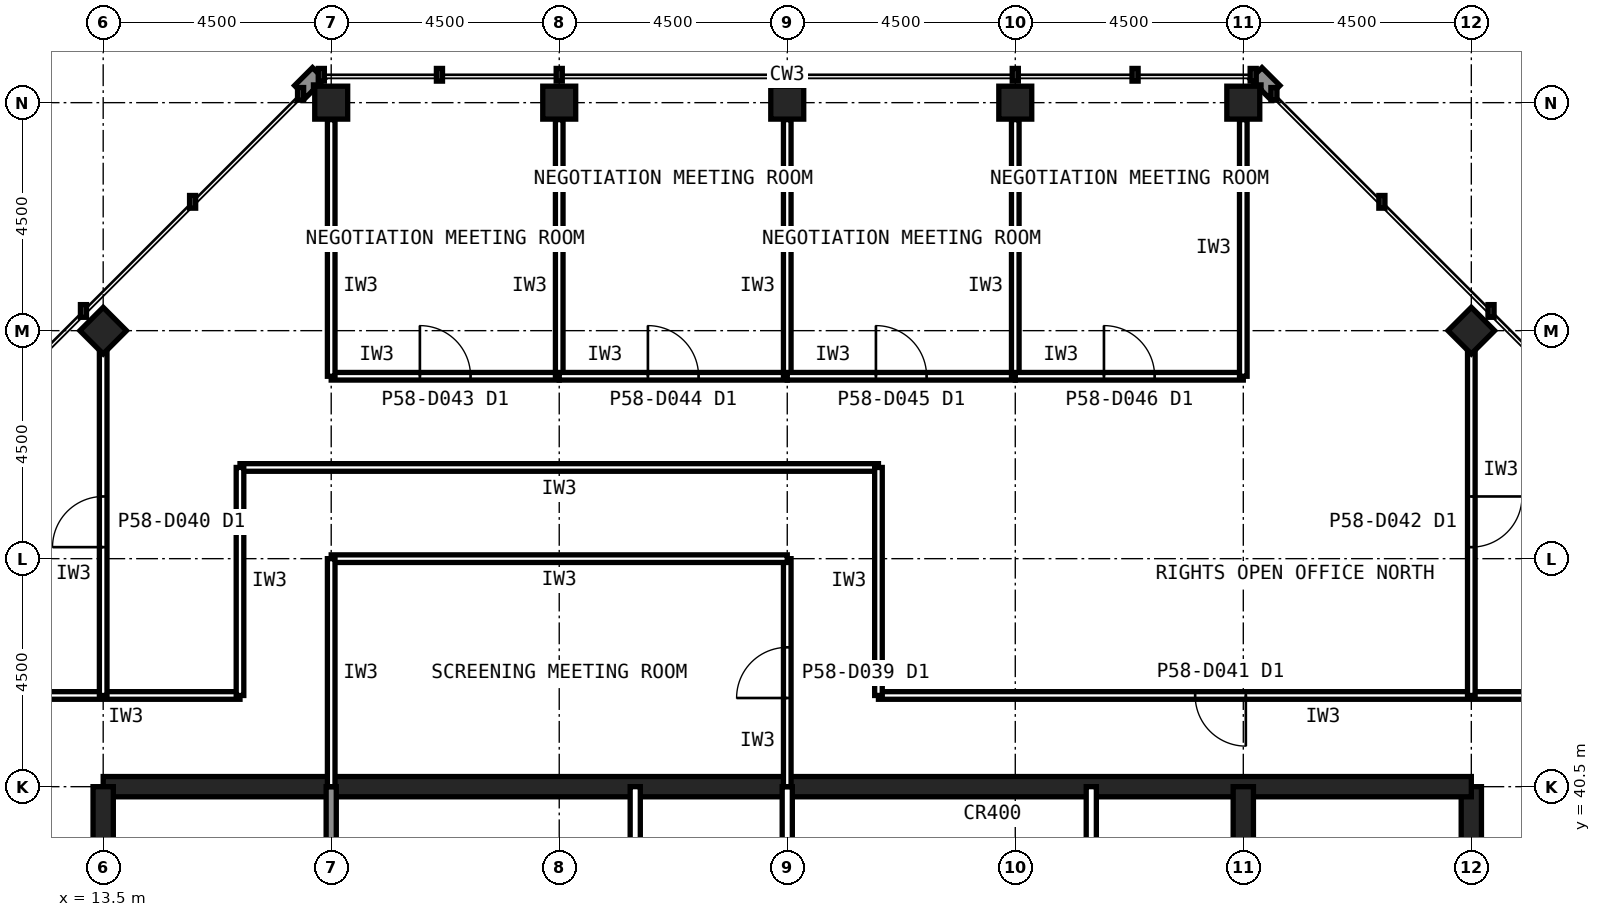
"""IFC4 building model, lengths in metres.
Left out: names, types, materials, properties, quantities, classifications, styles, units other than length and angle.
Written with IfcOpenShell. Run it as: python <this file> out.ifc"""

import sys

from ifc_helpers import new_model, si_unit, direction, frame, frame_2d, origin, origin_2d, place, context, subcontext, project, spatial, rectangle, hollow_rectangle, extrude, element, fill, save


model = new_model("IFC4")
c1 = context("Model", 3, precision=1e-05, world=origin(), true_north=direction((0.0, 1.0)))
c2 = subcontext(c1, "Body", "Model", "MODEL_VIEW")
j1 = project(units=[si_unit("LENGTHUNIT", "METRE"), si_unit("PLANEANGLEUNIT", "RADIAN")], contexts=[c1])
p1 = place(None, origin())
s1 = spatial("IfcSite", under=j1, at=p1, CompositionType="ELEMENT")
p2 = place(p1, origin())
s2 = spatial("IfcBuilding", under=s1, at=p2, CompositionType="ELEMENT")
p3 = place(p2, frame((0.0, 0.0, 246.6)))
s3 = spatial("IfcBuildingStorey", under=s2, at=p3, CompositionType="ELEMENT", Elevation=246.6)
for number, where, z_axis, x_axis in (
    (1, (36.0, 54.0, 0.0), (0.0, 0.0, 1.0), (1.0, 0.0, 0.0)),
    (2, (31.5, 54.0, 0.0), (0.0, 0.0, 1.0), (1.0, 0.0, 0.0)),
    (3, (27.0, 54.0, 0.0), (0.0, 0.0, 1.0), (1.0, 0.0, 0.0)),
    (4, (22.5, 54.0, 0.0), (0.0, 0.0, 1.0), (1.0, 0.0, 0.0)),
    (5, (18.0, 54.0, 0.0), (0.0, 0.0, 1.0), (1.0, 0.0, 0.0)),
    (6, (40.5, 49.5, 0.0), (0.0, 0.0, 1.0), (0.707, 0.707, 0.0)),
    (7, (13.5, 49.5, 0.0), (0.0, 0.0, 1.0), (0.707, 0.707, 0.0)),
):
    element("IfcColumn", number, at=place(p3, frame(where, z_axis=z_axis, x_axis=x_axis)), inside=s3, PredefinedType="COLUMN", context=c2, shape_type="SweptSolid", body=[
        extrude(hollow_rectangle(XDim=0.65, YDim=0.65, WallThickness=0.032, at=origin_2d()), origin(), (0.0, 0.0, 1.0), 4.0),
    ])
p4 = place(p3, frame((40.5, 13.5, 0.0), z_axis=(0.0, 0.0, 1.0), x_axis=(0.0, 1.0, 0.0)))
e8 = element("IfcWall", 8, at=p4, inside=s3, PredefinedType="SHEAR", context=c2, shape_type="SweptSolid", body=[
    extrude(rectangle(XDim=27.0, YDim=0.4, at=frame_2d((13.5, 0.0))), origin(), (0.0, 0.0, 1.0), 4.0),
])
p5 = place(p4, frame((5.85, 0.0, 0.0)))
e9 = element("IfcOpeningElement", 9, at=p5, cuts=e8, PredefinedType="OPENING", context=c2, shape_type="SweptSolid", body=[
    extrude(rectangle(XDim=1.8, YDim=2.1, at=frame_2d((0.9, 1.05))), frame((0.0, 0.21, 0.0), z_axis=(0.0, -1.0, 0.0), x_axis=(1.0, 0.0, 0.0)), (0.0, 0.0, 1.0), 0.42),
])
p6 = place(p4, frame((19.65, 0.0, 0.0)))
e10 = element("IfcOpeningElement", 10, at=p6, cuts=e8, PredefinedType="OPENING", context=c2, shape_type="SweptSolid", body=[
    extrude(rectangle(XDim=1.2, YDim=2.1, at=frame_2d((0.6, 1.05))), frame((0.0, 0.21, 0.0), z_axis=(0.0, -1.0, 0.0), x_axis=(1.0, 0.0, 0.0)), (0.0, 0.0, 1.0), 0.42),
])
p7 = place(p3, frame((40.5, 40.5, 0.0), z_axis=(0.0, 0.0, 1.0), x_axis=(-1.0, 0.0, 0.0)))
e11 = element("IfcWall", 11, at=p7, inside=s3, PredefinedType="SHEAR", context=c2, shape_type="SweptSolid", body=[
    extrude(rectangle(XDim=27.0, YDim=0.4, at=frame_2d((13.5, 0.0))), origin(), (0.0, 0.0, 1.0), 4.0),
])
p8 = place(p3, frame((13.5, 40.5, 0.0), z_axis=(0.0, 0.0, 1.0), x_axis=(0.0, -1.0, 0.0)))
e12 = element("IfcWall", 12, at=p8, inside=s3, PredefinedType="SHEAR", context=c2, shape_type="SweptSolid", body=[
    extrude(rectangle(XDim=27.0, YDim=0.4, at=frame_2d((13.5, 0.0))), origin(), (0.0, 0.0, 1.0), 4.0),
])
p9 = place(p8, frame((19.65, 0.0, 0.0)))
e13 = element("IfcOpeningElement", 13, at=p9, cuts=e12, PredefinedType="OPENING", context=c2, shape_type="SweptSolid", body=[
    extrude(rectangle(XDim=1.2, YDim=2.1, at=frame_2d((0.6, 1.05))), frame((0.0, 0.21, 0.0), z_axis=(0.0, -1.0, 0.0), x_axis=(1.0, 0.0, 0.0)), (0.0, 0.0, 1.0), 0.42),
])
p10 = place(p8, frame((5.85, 0.0, 0.0)))
e14 = element("IfcOpeningElement", 14, at=p10, cuts=e12, PredefinedType="OPENING", context=c2, shape_type="SweptSolid", body=[
    extrude(rectangle(XDim=1.8, YDim=2.1, at=frame_2d((0.9, 1.05))), frame((0.0, 0.21, 0.0), z_axis=(0.0, -1.0, 0.0), x_axis=(1.0, 0.0, 0.0)), (0.0, 0.0, 1.0), 0.42),
])
p11 = place(p3, frame((18.0, 36.0, 0.0), z_axis=(0.0, 0.0, 1.0), x_axis=(0.0, 1.0, 0.0)))
e15 = element("IfcWall", 15, at=p11, inside=s3, PredefinedType="SOLIDWALL", context=c2, shape_type="SweptSolid", body=[
    extrude(rectangle(XDim=4.5, YDim=0.2, at=frame_2d((2.25, 0.0))), origin(), (0.0, 0.0, 1.0), 3.84),
])
p12 = place(p3, frame((36.0, 22.5, 0.0), z_axis=(0.0, 0.0, 1.0), x_axis=(0.0, 1.0, 0.0)))
e16 = element("IfcWall", 16, at=p12, inside=s3, PredefinedType="SHEAR", context=c2, shape_type="SweptSolid", body=[
    extrude(rectangle(XDim=18.0, YDim=0.4, at=frame_2d((9.0, 0.0))), origin(), (0.0, 0.0, 1.0), 4.0),
])
for number, where, z_axis, x_axis in (
    (17, (24.0, 36.0, 0.0), (0.0, 0.0, 1.0), (0.0, 1.0, 0.0)),
    (18, (27.0, 36.0, 0.0), (0.0, 0.0, 1.0), (0.0, 1.0, 0.0)),
    (19, (33.0, 36.0, 0.0), (0.0, 0.0, 1.0), (0.0, 1.0, 0.0)),
):
    element("IfcWall", number, at=place(p3, frame(where, z_axis=z_axis, x_axis=x_axis)), inside=s3, PredefinedType="PARTITIONING", context=c2, shape_type="SweptSolid", body=[
        extrude(rectangle(XDim=4.5, YDim=0.2, at=frame_2d((2.25, 0.0))), origin(), (0.0, 0.0, 1.0), 3.84),
    ])
p13 = place(p3, frame((42.3, 42.3, 0.0), z_axis=(0.0, 0.0, 1.0), x_axis=(-1.0, 0.0, 0.0)))
e20 = element("IfcWall", 20, at=p13, inside=s3, PredefinedType="PARTITIONING", context=c2, shape_type="SweptSolid", body=[
    extrude(rectangle(XDim=13.5, YDim=0.15, at=frame_2d((6.75, 0.0))), origin(), (0.0, 0.0, 1.0), 3.84),
])
p14 = place(p13, frame((6.25, 0.0, 0.0)))
e21 = element("IfcOpeningElement", 21, at=p14, cuts=e20, PredefinedType="OPENING", context=c2, shape_type="SweptSolid", body=[
    extrude(rectangle(XDim=1.0, YDim=2.1, at=frame_2d((0.5, 1.05))), frame((0.0, 0.085, 0.0), z_axis=(0.0, -1.0, 0.0), x_axis=(1.0, 0.0, 0.0)), (0.0, 0.0, 1.0), 0.17),
])
p15 = place(p3, frame((28.8, 46.8, 0.0), z_axis=(0.0, 0.0, 1.0), x_axis=(-1.0, 0.0, 0.0)))
e22 = element("IfcWall", 22, at=p15, inside=s3, PredefinedType="PARTITIONING", context=c2, shape_type="SweptSolid", body=[
    extrude(rectangle(XDim=12.6, YDim=0.15, at=frame_2d((6.3, 0.0))), origin(), (0.0, 0.0, 1.0), 3.84),
])
for number, where, z_axis, x_axis in (
    (23, (16.2, 42.3, 0.0), (0.0, 0.0, 1.0), (-1.0, 0.0, 0.0)),
    (24, (16.2, 46.8, 0.0), (0.0, 0.0, 1.0), (0.0, -1.0, 0.0)),
    (25, (28.8, 42.3, 0.0), (0.0, 0.0, 1.0), (0.0, 1.0, 0.0)),
):
    element("IfcWall", number, at=place(p3, frame(where, z_axis=z_axis, x_axis=x_axis)), inside=s3, PredefinedType="PARTITIONING", context=c2, shape_type="SweptSolid", body=[
        extrude(rectangle(XDim=4.5, YDim=0.15, at=frame_2d((2.25, 0.0))), origin(), (0.0, 0.0, 1.0), 3.84),
    ])
p16 = place(p3, frame((27.0, 40.5, 0.0), z_axis=(0.0, 0.0, 1.0), x_axis=(0.0, 1.0, 0.0)))
e26 = element("IfcWall", 26, at=p16, inside=s3, PredefinedType="PARTITIONING", context=c2, shape_type="SweptSolid", body=[
    extrude(rectangle(XDim=4.5, YDim=0.15, at=frame_2d((2.25, 0.0))), origin(), (0.0, 0.0, 1.0), 2.989),
])
p17 = place(p16, frame((1.75, 0.0, 0.0)))
e27 = element("IfcOpeningElement", 27, at=p17, cuts=e26, PredefinedType="OPENING", context=c2, shape_type="SweptSolid", body=[
    extrude(rectangle(XDim=1.0, YDim=2.1, at=frame_2d((0.5, 1.05))), frame((0.0, 0.085, 0.0), z_axis=(0.0, -1.0, 0.0), x_axis=(1.0, 0.0, 0.0)), (0.0, 0.0, 1.0), 0.17),
])
p18 = place(p3, frame((27.0, 45.0, 0.0), z_axis=(0.0, 0.0, 1.0), x_axis=(-1.0, 0.0, 0.0)))
e28 = element("IfcWall", 28, at=p18, inside=s3, PredefinedType="PARTITIONING", context=c2, shape_type="SweptSolid", body=[
    extrude(rectangle(XDim=9.0, YDim=0.15, at=frame_2d((4.5, 0.0))), origin(), (0.0, 0.0, 1.0), 3.84),
])
p19 = place(p3, frame((18.0, 45.0, 0.0), z_axis=(0.0, 0.0, 1.0), x_axis=(0.0, -1.0, 0.0)))
e29 = element("IfcWall", 29, at=p19, inside=s3, PredefinedType="PARTITIONING", context=c2, shape_type="SweptSolid", body=[
    extrude(rectangle(XDim=4.5, YDim=0.15, at=frame_2d((2.25, 0.0))), origin(), (0.0, 0.0, 1.0), 2.989),
])
p20 = place(p3, frame((18.0, 48.6, 0.0), z_axis=(0.0, 0.0, 1.0), x_axis=(1.0, 0.0, 0.0)))
e30 = element("IfcWall", 30, at=p20, inside=s3, PredefinedType="PARTITIONING", context=c2, shape_type="SweptSolid", body=[
    extrude(rectangle(XDim=4.5, YDim=0.15, at=frame_2d((2.25, 0.0))), origin(), (0.0, 0.0, 1.0), 3.84),
])
p21 = place(p20, frame((1.75, 0.0, 0.0)))
e31 = element("IfcOpeningElement", 31, at=p21, cuts=e30, PredefinedType="OPENING", context=c2, shape_type="SweptSolid", body=[
    extrude(rectangle(XDim=1.0, YDim=2.1, at=frame_2d((0.5, 1.05))), frame((0.0, 0.085, 0.0), z_axis=(0.0, -1.0, 0.0), x_axis=(1.0, 0.0, 0.0)), (0.0, 0.0, 1.0), 0.17),
])
for number, where, z_axis, x_axis in (
    (32, (22.5, 48.6, 0.0), (0.0, 0.0, 1.0), (0.0, 1.0, 0.0)),
    (33, (18.0, 53.665, 0.0), (0.0, 0.0, 1.0), (0.0, -1.0, 0.0)),
):
    element("IfcWall", number, at=place(p3, frame(where, z_axis=z_axis, x_axis=x_axis)), inside=s3, PredefinedType="PARTITIONING", context=c2, shape_type="SweptSolid", body=[
        extrude(rectangle(XDim=5.065, YDim=0.15, at=frame_2d((2.532, 0.0))), origin(), (0.0, 0.0, 1.0), 2.989),
    ])
p22 = place(p3, frame((22.5, 48.6, 0.0), z_axis=(0.0, 0.0, 1.0), x_axis=(1.0, 0.0, 0.0)))
e34 = element("IfcWall", 34, at=p22, inside=s3, PredefinedType="PARTITIONING", context=c2, shape_type="SweptSolid", body=[
    extrude(rectangle(XDim=4.5, YDim=0.15, at=frame_2d((2.25, 0.0))), origin(), (0.0, 0.0, 1.0), 3.84),
])
p23 = place(p22, frame((1.75, 0.0, 0.0)))
e35 = element("IfcOpeningElement", 35, at=p23, cuts=e34, PredefinedType="OPENING", context=c2, shape_type="SweptSolid", body=[
    extrude(rectangle(XDim=1.0, YDim=2.1, at=frame_2d((0.5, 1.05))), frame((0.0, 0.085, 0.0), z_axis=(0.0, -1.0, 0.0), x_axis=(1.0, 0.0, 0.0)), (0.0, 0.0, 1.0), 0.17),
])
p24 = place(p3, frame((27.0, 48.6, 0.0), z_axis=(0.0, 0.0, 1.0), x_axis=(0.0, 1.0, 0.0)))
e36 = element("IfcWall", 36, at=p24, inside=s3, PredefinedType="PARTITIONING", context=c2, shape_type="SweptSolid", body=[
    extrude(rectangle(XDim=5.065, YDim=0.15, at=frame_2d((2.532, 0.0))), origin(), (0.0, 0.0, 1.0), 2.989),
])
p25 = place(p3, frame((27.0, 48.6, 0.0), z_axis=(0.0, 0.0, 1.0), x_axis=(1.0, 0.0, 0.0)))
e37 = element("IfcWall", 37, at=p25, inside=s3, PredefinedType="PARTITIONING", context=c2, shape_type="SweptSolid", body=[
    extrude(rectangle(XDim=4.5, YDim=0.15, at=frame_2d((2.25, 0.0))), origin(), (0.0, 0.0, 1.0), 3.84),
])
p26 = place(p25, frame((1.75, 0.0, 0.0)))
e38 = element("IfcOpeningElement", 38, at=p26, cuts=e37, PredefinedType="OPENING", context=c2, shape_type="SweptSolid", body=[
    extrude(rectangle(XDim=1.0, YDim=2.1, at=frame_2d((0.5, 1.05))), frame((0.0, 0.085, 0.0), z_axis=(0.0, -1.0, 0.0), x_axis=(1.0, 0.0, 0.0)), (0.0, 0.0, 1.0), 0.17),
])
p27 = place(p3, frame((31.5, 48.6, 0.0), z_axis=(0.0, 0.0, 1.0), x_axis=(0.0, 1.0, 0.0)))
e39 = element("IfcWall", 39, at=p27, inside=s3, PredefinedType="PARTITIONING", context=c2, shape_type="SweptSolid", body=[
    extrude(rectangle(XDim=5.065, YDim=0.15, at=frame_2d((2.532, 0.0))), origin(), (0.0, 0.0, 1.0), 2.989),
])
p28 = place(p3, frame((31.5, 48.6, 0.0), z_axis=(0.0, 0.0, 1.0), x_axis=(1.0, 0.0, 0.0)))
e40 = element("IfcWall", 40, at=p28, inside=s3, PredefinedType="PARTITIONING", context=c2, shape_type="SweptSolid", body=[
    extrude(rectangle(XDim=4.5, YDim=0.15, at=frame_2d((2.25, 0.0))), origin(), (0.0, 0.0, 1.0), 3.84),
])
p29 = place(p28, frame((1.75, 0.0, 0.0)))
e41 = element("IfcOpeningElement", 41, at=p29, cuts=e40, PredefinedType="OPENING", context=c2, shape_type="SweptSolid", body=[
    extrude(rectangle(XDim=1.0, YDim=2.1, at=frame_2d((0.5, 1.05))), frame((0.0, 0.085, 0.0), z_axis=(0.0, -1.0, 0.0), x_axis=(1.0, 0.0, 0.0)), (0.0, 0.0, 1.0), 0.17),
])
p30 = place(p3, frame((36.0, 48.6, 0.0), z_axis=(0.0, 0.0, 1.0), x_axis=(0.0, 1.0, 0.0)))
e42 = element("IfcWall", 42, at=p30, inside=s3, PredefinedType="PARTITIONING", context=c2, shape_type="SweptSolid", body=[
    extrude(rectangle(XDim=5.065, YDim=0.15, at=frame_2d((2.532, 0.0))), origin(), (0.0, 0.0, 1.0), 2.989),
])
p31 = place(p3, frame((40.5, 49.155, 0.0), z_axis=(0.0, 0.0, 1.0), x_axis=(0.0, -1.0, 0.0)))
e43 = element("IfcWall", 43, at=p31, inside=s3, PredefinedType="PARTITIONING", context=c2, shape_type="SweptSolid", body=[
    extrude(rectangle(XDim=6.855, YDim=0.15, at=frame_2d((3.427, 0.0))), origin(), (0.0, 0.0, 1.0), 2.989),
])
p32 = place(p31, frame((2.927, 0.0, 0.0)))
e44 = element("IfcOpeningElement", 44, at=p32, cuts=e43, PredefinedType="OPENING", context=c2, shape_type="SweptSolid", body=[
    extrude(rectangle(XDim=1.0, YDim=2.1, at=frame_2d((0.5, 1.05))), frame((0.0, 0.085, 0.0), z_axis=(0.0, -1.0, 0.0), x_axis=(1.0, 0.0, 0.0)), (0.0, 0.0, 1.0), 0.17),
])
p33 = place(p3, frame((13.5, 42.3, 0.0), z_axis=(0.0, 0.0, 1.0), x_axis=(0.0, 1.0, 0.0)))
e45 = element("IfcWall", 45, at=p33, inside=s3, PredefinedType="PARTITIONING", context=c2, shape_type="SweptSolid", body=[
    extrude(rectangle(XDim=6.855, YDim=0.15, at=frame_2d((3.427, 0.0))), origin(), (0.0, 0.0, 1.0), 2.989),
])
p34 = place(p33, frame((2.927, 0.0, 0.0)))
e46 = element("IfcOpeningElement", 46, at=p34, cuts=e45, PredefinedType="OPENING", context=c2, shape_type="SweptSolid", body=[
    extrude(rectangle(XDim=1.0, YDim=2.1, at=frame_2d((0.5, 1.05))), frame((0.0, 0.085, 0.0), z_axis=(0.0, -1.0, 0.0), x_axis=(1.0, 0.0, 0.0)), (0.0, 0.0, 1.0), 0.17),
])
p35 = place(p14, origin())
e47 = element("IfcDoor", 47, at=p35, inside=s3, OperationType="SINGLE_SWING_LEFT", PredefinedType="DOOR", context=c2, shape_type="SweptSolid", body=[
    extrude(rectangle(XDim=1.0, YDim=2.1, at=frame_2d((0.5, 1.05))), frame((0.0, 0.025, 0.0), z_axis=(0.0, -1.0, 0.0), x_axis=(1.0, 0.0, 0.0)), (0.0, 0.0, 1.0), 0.05),
])
fill(e21, e47)
p36 = place(p17, origin())
e48 = element("IfcDoor", 48, at=p36, inside=s3, OperationType="SINGLE_SWING_LEFT", PredefinedType="DOOR", context=c2, shape_type="SweptSolid", body=[
    extrude(rectangle(XDim=1.0, YDim=2.1, at=frame_2d((0.5, 1.05))), frame((0.0, 0.025, 0.0), z_axis=(0.0, -1.0, 0.0), x_axis=(1.0, 0.0, 0.0)), (0.0, 0.0, 1.0), 0.05),
])
fill(e27, e48)
p37 = place(p21, origin())
e49 = element("IfcDoor", 49, at=p37, inside=s3, OperationType="SINGLE_SWING_LEFT", PredefinedType="DOOR", context=c2, shape_type="SweptSolid", body=[
    extrude(rectangle(XDim=1.0, YDim=2.1, at=frame_2d((0.5, 1.05))), frame((0.0, 0.025, 0.0), z_axis=(0.0, -1.0, 0.0), x_axis=(1.0, 0.0, 0.0)), (0.0, 0.0, 1.0), 0.05),
])
fill(e31, e49)
p38 = place(p23, origin())
e50 = element("IfcDoor", 50, at=p38, inside=s3, OperationType="SINGLE_SWING_LEFT", PredefinedType="DOOR", context=c2, shape_type="SweptSolid", body=[
    extrude(rectangle(XDim=1.0, YDim=2.1, at=frame_2d((0.5, 1.05))), frame((0.0, 0.025, 0.0), z_axis=(0.0, -1.0, 0.0), x_axis=(1.0, 0.0, 0.0)), (0.0, 0.0, 1.0), 0.05),
])
fill(e35, e50)
p39 = place(p26, origin())
e51 = element("IfcDoor", 51, at=p39, inside=s3, OperationType="SINGLE_SWING_LEFT", PredefinedType="DOOR", context=c2, shape_type="SweptSolid", body=[
    extrude(rectangle(XDim=1.0, YDim=2.1, at=frame_2d((0.5, 1.05))), frame((0.0, 0.025, 0.0), z_axis=(0.0, -1.0, 0.0), x_axis=(1.0, 0.0, 0.0)), (0.0, 0.0, 1.0), 0.05),
])
fill(e38, e51)
p40 = place(p29, origin())
e52 = element("IfcDoor", 52, at=p40, inside=s3, OperationType="SINGLE_SWING_LEFT", PredefinedType="DOOR", context=c2, shape_type="SweptSolid", body=[
    extrude(rectangle(XDim=1.0, YDim=2.1, at=frame_2d((0.5, 1.05))), frame((0.0, 0.025, 0.0), z_axis=(0.0, -1.0, 0.0), x_axis=(1.0, 0.0, 0.0)), (0.0, 0.0, 1.0), 0.05),
])
fill(e41, e52)
p41 = place(p32, origin())
e53 = element("IfcDoor", 53, at=p41, inside=s3, OperationType="SINGLE_SWING_LEFT", PredefinedType="DOOR", context=c2, shape_type="SweptSolid", body=[
    extrude(rectangle(XDim=1.0, YDim=2.1, at=frame_2d((0.5, 1.05))), frame((0.0, 0.025, 0.0), z_axis=(0.0, -1.0, 0.0), x_axis=(1.0, 0.0, 0.0)), (0.0, 0.0, 1.0), 0.05),
])
fill(e44, e53)
p42 = place(p34, origin())
e54 = element("IfcDoor", 54, at=p42, inside=s3, OperationType="SINGLE_SWING_LEFT", PredefinedType="DOOR", context=c2, shape_type="SweptSolid", body=[
    extrude(rectangle(XDim=1.0, YDim=2.1, at=frame_2d((0.5, 1.05))), frame((0.0, 0.025, 0.0), z_axis=(0.0, -1.0, 0.0), x_axis=(1.0, 0.0, 0.0)), (0.0, 0.0, 1.0), 0.05),
])
fill(e46, e54)
save(model, sys.argv[1])
